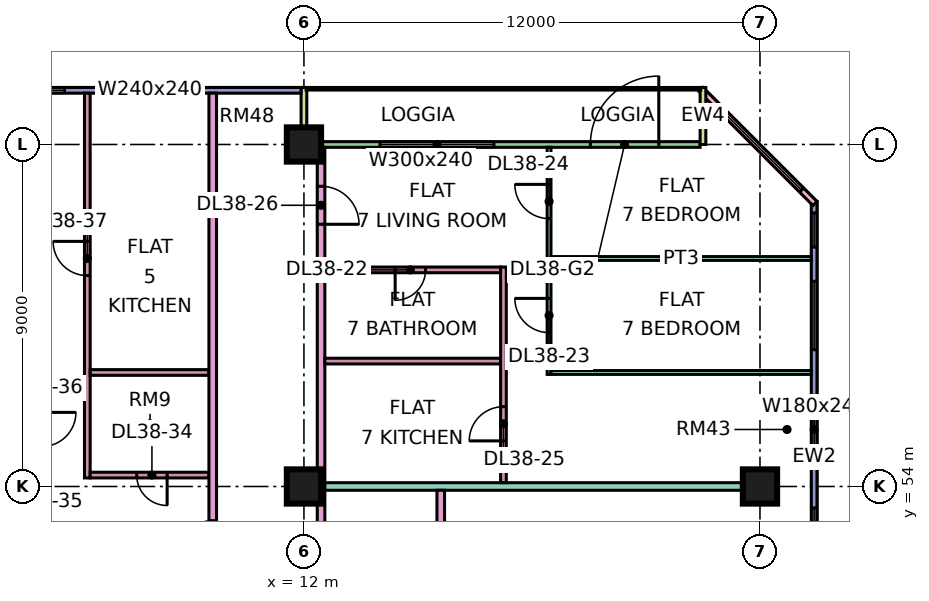
"""IFC4 building model, lengths in metres.
Left out: names, types, materials, properties, quantities, classifications, styles, units other than length and angle.
Written with IfcOpenShell. Run it as: python <this file> out.ifc"""

import sys

from ifc_helpers import new_model, si_unit, direction, frame, frame_2d, origin, origin_2d, place, context, subcontext, project, spatial, rectangle, extrude, element, fill, save


model = new_model("IFC4")
c1 = context("Model", 3, precision=1e-05, world=origin(), true_north=direction((0.0, 1.0)))
c2 = subcontext(c1, "Body", "Model", "MODEL_VIEW")
j1 = project(units=[si_unit("LENGTHUNIT", "METRE"), si_unit("PLANEANGLEUNIT", "RADIAN")], contexts=[c1])
p1 = place(None, origin())
s1 = spatial("IfcSite", under=j1, at=p1, CompositionType="ELEMENT")
p2 = place(p1, origin())
s2 = spatial("IfcBuilding", under=s1, at=p2, CompositionType="ELEMENT")
p3 = place(p2, frame((0.0, 0.0, 168.65)))
s3 = spatial("IfcBuildingStorey", under=s2, at=p3, CompositionType="ELEMENT", Elevation=168.65)
for number, where, z_axis, x_axis in (
    (1, (12.0, 54.0, 0.0), (0.0, 0.0, 1.0), (1.0, 0.0, 0.0)),
    (2, (12.0, 63.0, 0.0), (0.0, 0.0, 1.0), (1.0, 0.0, 0.0)),
    (3, (24.0, 54.0, 0.0), (0.0, 0.0, 1.0), (1.0, 0.0, 0.0)),
):
    element("IfcColumn", number, at=place(p3, frame(where, z_axis=z_axis, x_axis=x_axis)), inside=s3, PredefinedType="COLUMN", context=c2, shape_type="SweptSolid", body=[
        extrude(rectangle(XDim=0.9, YDim=0.9, at=origin_2d()), origin(), (0.0, 0.0, 1.0), 3.75),
    ])
p4 = place(p3, frame((25.425, 48.075, 0.0), z_axis=(0.0, 0.0, 1.0), x_axis=(0.0, 1.0, 0.0)))
e4 = element("IfcWall", 4, at=p4, inside=s3, PredefinedType="SOLIDWALL", context=c2, shape_type="SweptSolid", body=[
    extrude(rectangle(XDim=13.425, YDim=0.15, at=frame_2d((6.712, 0.0))), origin(), (0.0, 0.0, 1.0), 3.35),
])
p5 = place(p4, frame((0.562, 0.0, 0.45)))
e5 = element("IfcOpeningElement", 5, at=p5, cuts=e4, PredefinedType="OPENING", context=c2, shape_type="SweptSolid", body=[
    extrude(rectangle(XDim=4.8, YDim=2.4, at=frame_2d((2.4, 1.2))), frame((0.0, 0.085, 0.0), z_axis=(0.0, -1.0, 0.0), x_axis=(1.0, 0.0, 0.0)), (0.0, 0.0, 1.0), 0.17),
])
p6 = place(p4, frame((6.525, 0.0, 0.45)))
e6 = element("IfcOpeningElement", 6, at=p6, cuts=e4, PredefinedType="OPENING", context=c2, shape_type="SweptSolid", body=[
    extrude(rectangle(XDim=1.8, YDim=2.4, at=frame_2d((0.9, 1.2))), frame((0.0, 0.085, 0.0), z_axis=(0.0, -1.0, 0.0), x_axis=(1.0, 0.0, 0.0)), (0.0, 0.0, 1.0), 0.17),
])
p7 = place(p4, frame((9.525, 0.0, 0.45)))
e7 = element("IfcOpeningElement", 7, at=p7, cuts=e4, PredefinedType="OPENING", context=c2, shape_type="SweptSolid", body=[
    extrude(rectangle(XDim=1.8, YDim=2.4, at=frame_2d((0.9, 1.2))), frame((0.0, 0.085, 0.0), z_axis=(0.0, -1.0, 0.0), x_axis=(1.0, 0.0, 0.0)), (0.0, 0.0, 1.0), 0.17),
])
p8 = place(p4, frame((12.225, 0.0, 0.45)))
e8 = element("IfcOpeningElement", 8, at=p8, cuts=e4, PredefinedType="OPENING", context=c2, shape_type="SweptSolid", body=[
    extrude(rectangle(XDim=0.9, YDim=2.4, at=frame_2d((0.45, 1.2))), frame((0.0, 0.085, 0.0), z_axis=(0.0, -1.0, 0.0), x_axis=(1.0, 0.0, 0.0)), (0.0, 0.0, 1.0), 0.17),
])
p9 = place(p3, frame((25.447, 61.447, 0.0), z_axis=(0.0, 0.0, 1.0), x_axis=(-0.707106781187, 0.707106781187, 0.0)))
e9 = element("IfcWall", 9, at=p9, inside=s3, PredefinedType="SOLIDWALL", context=c2, shape_type="SweptSolid", body=[
    extrude(rectangle(XDim=4.243, YDim=0.15, at=frame_2d((2.121, 0.0))), origin(), (0.0, 0.0, 1.0), 3.35),
])
p10 = place(p9, frame((0.498, 0.0, 0.45)))
e10 = element("IfcOpeningElement", 10, at=p10, cuts=e9, PredefinedType="OPENING", context=c2, shape_type="SweptSolid", body=[
    extrude(rectangle(XDim=3.0, YDim=2.4, at=frame_2d((1.5, 1.2))), frame((0.0, 0.085, 0.0), z_axis=(0.0, -1.0, 0.0), x_axis=(1.0, 0.0, 0.0)), (0.0, 0.0, 1.0), 0.17),
])
p11 = place(p3, frame((22.425, 63.0, 0.0), z_axis=(0.0, 0.0, 1.0), x_axis=(-1.0, 0.0, 0.0)))
e11 = element("IfcWall", 11, at=p11, inside=s3, PredefinedType="SOLIDWALL", context=c2, shape_type="SweptSolid", body=[
    extrude(rectangle(XDim=10.35, YDim=0.15, at=frame_2d((5.175, 0.0))), origin(), (0.0, 0.0, 1.0), 3.35),
])
p12 = place(p11, frame((1.087, 0.0, 0.0)))
e12 = element("IfcOpeningElement", 12, at=p12, cuts=e11, PredefinedType="OPENING", context=c2, shape_type="SweptSolid", body=[
    extrude(rectangle(XDim=1.8, YDim=2.4, at=frame_2d((0.9, 1.2))), frame((0.0, 0.085, 0.0), z_axis=(0.0, -1.0, 0.0), x_axis=(1.0, 0.0, 0.0)), (0.0, 0.0, 1.0), 0.17),
])
p13 = place(p11, frame((5.425, 0.0, 0.45)))
e13 = element("IfcOpeningElement", 13, at=p13, cuts=e11, PredefinedType="OPENING", context=c2, shape_type="SweptSolid", body=[
    extrude(rectangle(XDim=3.0, YDim=2.4, at=frame_2d((1.5, 1.2))), frame((0.0, 0.085, 0.0), z_axis=(0.0, -1.0, 0.0), x_axis=(1.0, 0.0, 0.0)), (0.0, 0.0, 1.0), 0.17),
])
for number, where, z_axis, x_axis in (
    (14, (22.5, 64.5, 0.0), (0.0, 0.0, 1.0), (0.0, -1.0, 0.0)),
    (15, (12.0, 64.5, 0.0), (0.0, 0.0, 1.0), (0.0, -1.0, 0.0)),
):
    element("IfcWall", number, at=place(p3, frame(where, z_axis=z_axis, x_axis=x_axis)), inside=s3, PredefinedType="SOLIDWALL", context=c2, shape_type="SweptSolid", body=[
        extrude(rectangle(XDim=1.5, YDim=0.15, at=frame_2d((0.75, 0.0))), origin(), (0.0, 0.0, 1.0), 3.35),
    ])
p14 = place(p3, frame((11.925, 64.425, 0.0), z_axis=(0.0, 0.0, 1.0), x_axis=(-1.0, 0.0, 0.0)))
e16 = element("IfcWall", 16, at=p14, inside=s3, PredefinedType="SOLIDWALL", context=c2, shape_type="SweptSolid", body=[
    extrude(rectangle(XDim=10.425, YDim=0.15, at=frame_2d((5.212, 0.0))), origin(), (0.0, 0.0, 1.0), 3.35),
])
p15 = place(p14, frame((2.775, 0.0, 0.45)))
e17 = element("IfcOpeningElement", 17, at=p15, cuts=e16, PredefinedType="OPENING", context=c2, shape_type="SweptSolid", body=[
    extrude(rectangle(XDim=2.4, YDim=2.4, at=frame_2d((1.2, 1.2))), frame((0.0, 0.085, 0.0), z_axis=(0.0, -1.0, 0.0), x_axis=(1.0, 0.0, 0.0)), (0.0, 0.0, 1.0), 0.17),
])
p16 = place(p14, frame((6.225, 0.0, 0.45)))
e18 = element("IfcOpeningElement", 18, at=p16, cuts=e16, PredefinedType="OPENING", context=c2, shape_type="SweptSolid", body=[
    extrude(rectangle(XDim=3.6, YDim=2.4, at=frame_2d((1.8, 1.2))), frame((0.0, 0.085, 0.0), z_axis=(0.0, -1.0, 0.0), x_axis=(1.0, 0.0, 0.0)), (0.0, 0.0, 1.0), 0.17),
])
p17 = place(p3, frame((6.3, 54.225, 0.0), z_axis=(0.0, 0.0, 1.0), x_axis=(0.0, 1.0, 0.0)))
e19 = element("IfcWall", 19, at=p17, inside=s3, PredefinedType="PARTITIONING", context=c2, shape_type="SweptSolid", body=[
    extrude(rectangle(XDim=10.125, YDim=0.15, at=frame_2d((5.062, 0.0))), origin(), (0.0, 0.0, 1.0), 3.35),
])
p18 = place(p17, frame((5.325, 0.0, 0.0)))
e20 = element("IfcOpeningElement", 20, at=p18, cuts=e19, PredefinedType="OPENING", context=c2, shape_type="SweptSolid", body=[
    extrude(rectangle(XDim=0.9, YDim=2.1, at=frame_2d((0.45, 1.05))), frame((0.0, 0.085, 0.0), z_axis=(0.0, -1.0, 0.0), x_axis=(1.0, 0.0, 0.0)), (0.0, 0.0, 1.0), 0.17),
])
p19 = place(p3, frame((6.375, 54.3, 0.0), z_axis=(0.0, 0.0, 1.0), x_axis=(1.0, 0.0, 0.0)))
e21 = element("IfcWall", 21, at=p19, inside=s3, PredefinedType="PARTITIONING", context=c2, shape_type="SweptSolid", body=[
    extrude(rectangle(XDim=3.125, YDim=0.15, at=frame_2d((1.562, 0.0))), origin(), (0.0, 0.0, 1.0), 3.35),
])
p20 = place(p19, frame((1.225, 0.0, 0.0)))
e22 = element("IfcOpeningElement", 22, at=p20, cuts=e21, PredefinedType="OPENING", context=c2, shape_type="SweptSolid", body=[
    extrude(rectangle(XDim=0.8, YDim=2.1, at=frame_2d((0.4, 1.05))), frame((0.0, 0.085, 0.0), z_axis=(0.0, -1.0, 0.0), x_axis=(1.0, 0.0, 0.0)), (0.0, 0.0, 1.0), 0.17),
])
p21 = place(p3, frame((6.375, 57.0, 0.0), z_axis=(0.0, 0.0, 1.0), x_axis=(1.0, 0.0, 0.0)))
e23 = element("IfcWall", 23, at=p21, inside=s3, PredefinedType="PARTITIONING", context=c2, shape_type="SweptSolid", body=[
    extrude(rectangle(XDim=3.125, YDim=0.15, at=frame_2d((1.562, 0.0))), origin(), (0.0, 0.0, 1.0), 3.35),
])
p22 = place(p3, frame((9.6, 20.0, 0.0), z_axis=(0.0, 0.0, 1.0), x_axis=(0.0, 1.0, 0.0)))
e24 = element("IfcWall", 24, at=p22, inside=s3, PredefinedType="PARTITIONING", context=c2, shape_type="SweptSolid", body=[
    extrude(rectangle(XDim=44.35, YDim=0.2, at=frame_2d((22.175, 0.0))), origin(), (0.0, 0.0, 1.0), 3.35),
])
p23 = place(p22, frame((28.8, 0.0, 0.0)))
e25 = element("IfcOpeningElement", 25, at=p23, cuts=e24, PredefinedType="OPENING", context=c2, shape_type="SweptSolid", body=[
    extrude(rectangle(XDim=1.0, YDim=2.1, at=frame_2d((0.5, 1.05))), frame((0.0, 0.11, 0.0), z_axis=(0.0, -1.0, 0.0), x_axis=(1.0, 0.0, 0.0)), (0.0, 0.0, 1.0), 0.22),
])
p24 = place(p22, frame((32.1, 0.0, 0.0)))
e26 = element("IfcOpeningElement", 26, at=p24, cuts=e24, PredefinedType="OPENING", context=c2, shape_type="SweptSolid", body=[
    extrude(rectangle(XDim=1.0, YDim=2.1, at=frame_2d((0.5, 1.05))), frame((0.0, 0.11, 0.0), z_axis=(0.0, -1.0, 0.0), x_axis=(1.0, 0.0, 0.0)), (0.0, 0.0, 1.0), 0.22),
])
p25 = place(p22, frame((0.6, 0.0, 0.0)))
e27 = element("IfcOpeningElement", 27, at=p25, cuts=e24, PredefinedType="OPENING", context=c2, shape_type="SweptSolid", body=[
    extrude(rectangle(XDim=1.2, YDim=2.1, at=frame_2d((0.6, 1.05))), frame((0.0, 0.11, 0.0), z_axis=(0.0, -1.0, 0.0), x_axis=(1.0, 0.0, 0.0)), (0.0, 0.0, 1.0), 0.22),
])
p26 = place(p22, frame((14.25, 0.0, 0.0)))
e28 = element("IfcOpeningElement", 28, at=p26, cuts=e24, PredefinedType="OPENING", context=c2, shape_type="SweptSolid", body=[
    extrude(rectangle(XDim=1.0, YDim=2.1, at=frame_2d((0.5, 1.05))), frame((0.0, 0.11, 0.0), z_axis=(0.0, -1.0, 0.0), x_axis=(1.0, 0.0, 0.0)), (0.0, 0.0, 1.0), 0.22),
])
p27 = place(p3, frame((12.45, 20.0, 0.0), z_axis=(0.0, 0.0, 1.0), x_axis=(0.0, 1.0, 0.0)))
e29 = element("IfcWall", 29, at=p27, inside=s3, PredefinedType="PARTITIONING", context=c2, shape_type="SweptSolid", body=[
    extrude(rectangle(XDim=42.926, YDim=0.2, at=frame_2d((21.463, 0.0))), origin(), (0.0, 0.0, 1.0), 3.35),
])
p28 = place(p27, frame((6.55, 0.0, 0.0)))
e30 = element("IfcOpeningElement", 30, at=p28, cuts=e29, PredefinedType="OPENING", context=c2, shape_type="SweptSolid", body=[
    extrude(rectangle(XDim=1.0, YDim=2.1, at=frame_2d((0.5, 1.05))), frame((0.0, 0.11, 0.0), z_axis=(0.0, -1.0, 0.0), x_axis=(1.0, 0.0, 0.0)), (0.0, 0.0, 1.0), 0.22),
])
p29 = place(p27, frame((12.25, 0.0, 0.0)))
e31 = element("IfcOpeningElement", 31, at=p29, cuts=e29, PredefinedType="OPENING", context=c2, shape_type="SweptSolid", body=[
    extrude(rectangle(XDim=1.6, YDim=2.1, at=frame_2d((0.8, 1.05))), frame((0.0, 0.11, 0.0), z_axis=(0.0, -1.0, 0.0), x_axis=(1.0, 0.0, 0.0)), (0.0, 0.0, 1.0), 0.22),
])
p30 = place(p27, frame((16.9, 0.0, 0.0)))
e32 = element("IfcOpeningElement", 32, at=p30, cuts=e29, PredefinedType="OPENING", context=c2, shape_type="SweptSolid", body=[
    extrude(rectangle(XDim=1.0, YDim=2.1, at=frame_2d((0.5, 1.05))), frame((0.0, 0.11, 0.0), z_axis=(0.0, -1.0, 0.0), x_axis=(1.0, 0.0, 0.0)), (0.0, 0.0, 1.0), 0.22),
])
p31 = place(p27, frame((40.9, 0.0, 0.0)))
e33 = element("IfcOpeningElement", 33, at=p31, cuts=e29, PredefinedType="OPENING", context=c2, shape_type="SweptSolid", body=[
    extrude(rectangle(XDim=1.0, YDim=2.1, at=frame_2d((0.5, 1.05))), frame((0.0, 0.11, 0.0), z_axis=(0.0, -1.0, 0.0), x_axis=(1.0, 0.0, 0.0)), (0.0, 0.0, 1.0), 0.22),
])
p32 = place(p27, frame((1.15, 0.0, 0.0)))
e34 = element("IfcOpeningElement", 34, at=p32, cuts=e29, PredefinedType="OPENING", context=c2, shape_type="SweptSolid", body=[
    extrude(rectangle(XDim=1.8, YDim=2.1, at=frame_2d((0.9, 1.05))), frame((0.0, 0.11, 0.0), z_axis=(0.0, -1.0, 0.0), x_axis=(1.0, 0.0, 0.0)), (0.0, 0.0, 1.0), 0.22),
])
p33 = place(p27, frame((28.6, 0.0, 0.0)))
e35 = element("IfcOpeningElement", 35, at=p33, cuts=e29, PredefinedType="OPENING", context=c2, shape_type="SweptSolid", body=[
    extrude(rectangle(XDim=1.8, YDim=2.1, at=frame_2d((0.9, 1.05))), frame((0.0, 0.11, 0.0), z_axis=(0.0, -1.0, 0.0), x_axis=(1.0, 0.0, 0.0)), (0.0, 0.0, 1.0), 0.22),
])
p34 = place(p3, frame((12.55, 54.0, 0.0), z_axis=(0.0, 0.0, 1.0), x_axis=(1.0, 0.0, 0.0)))
e36 = element("IfcWall", 36, at=p34, inside=s3, PredefinedType="PARTITIONING", context=c2, shape_type="SweptSolid", body=[
    extrude(rectangle(XDim=11.45, YDim=0.2, at=frame_2d((5.725, 0.0))), origin(), (0.0, 0.0, 1.0), 3.35),
])
p35 = place(p3, frame((12.55, 57.3, 0.0), z_axis=(0.0, 0.0, 1.0), x_axis=(1.0, 0.0, 0.0)))
e37 = element("IfcWall", 37, at=p35, inside=s3, PredefinedType="PARTITIONING", context=c2, shape_type="SweptSolid", body=[
    extrude(rectangle(XDim=4.625, YDim=0.15, at=frame_2d((2.312, 0.0))), origin(), (0.0, 0.0, 1.0), 3.35),
])
p36 = place(p3, frame((12.55, 59.7, 0.0), z_axis=(0.0, 0.0, 1.0), x_axis=(1.0, 0.0, 0.0)))
e38 = element("IfcWall", 38, at=p36, inside=s3, PredefinedType="PARTITIONING", context=c2, shape_type="SweptSolid", body=[
    extrude(rectangle(XDim=4.625, YDim=0.15, at=frame_2d((2.312, 0.0))), origin(), (0.0, 0.0, 1.0), 3.35),
])
p37 = place(p36, frame((1.85, 0.0, 0.0)))
e39 = element("IfcOpeningElement", 39, at=p37, cuts=e38, PredefinedType="OPENING", context=c2, shape_type="SweptSolid", body=[
    extrude(rectangle(XDim=0.8, YDim=2.1, at=frame_2d((0.4, 1.05))), frame((0.0, 0.085, 0.0), z_axis=(0.0, -1.0, 0.0), x_axis=(1.0, 0.0, 0.0)), (0.0, 0.0, 1.0), 0.17),
])
p38 = place(p3, frame((15.6, 51.225, 0.0), z_axis=(0.0, 0.0, 1.0), x_axis=(0.0, 1.0, 0.0)))
e40 = element("IfcWall", 40, at=p38, inside=s3, PredefinedType="PARTITIONING", context=c2, shape_type="SweptSolid", body=[
    extrude(rectangle(XDim=2.675, YDim=0.2, at=frame_2d((1.337, 0.0))), origin(), (0.0, 0.0, 1.0), 3.35),
])
p39 = place(p3, frame((17.25, 54.1, 0.0), z_axis=(0.0, 0.0, 1.0), x_axis=(0.0, 1.0, 0.0)))
e41 = element("IfcWall", 41, at=p39, inside=s3, PredefinedType="PARTITIONING", context=c2, shape_type="SweptSolid", body=[
    extrude(rectangle(XDim=5.675, YDim=0.15, at=frame_2d((2.837, 0.0))), origin(), (0.0, 0.0, 1.0), 3.35),
])
p40 = place(p39, frame((1.1, 0.0, 0.0)))
e42 = element("IfcOpeningElement", 42, at=p40, cuts=e41, PredefinedType="OPENING", context=c2, shape_type="SweptSolid", body=[
    extrude(rectangle(XDim=0.9, YDim=2.1, at=frame_2d((0.45, 1.05))), frame((0.0, 0.085, 0.0), z_axis=(0.0, -1.0, 0.0), x_axis=(1.0, 0.0, 0.0)), (0.0, 0.0, 1.0), 0.17),
])
p41 = place(p3, frame((18.45, 56.95, 0.0), z_axis=(0.0, 0.0, 1.0), x_axis=(0.0, 1.0, 0.0)))
e43 = element("IfcWall", 43, at=p41, inside=s3, PredefinedType="PARTITIONING", context=c2, shape_type="SweptSolid", body=[
    extrude(rectangle(XDim=5.976, YDim=0.1, at=frame_2d((2.988, 0.0))), origin(), (0.0, 0.0, 1.0), 3.35),
])
p42 = place(p41, frame((1.1, 0.0, 0.0)))
e44 = element("IfcOpeningElement", 44, at=p42, cuts=e43, PredefinedType="OPENING", context=c2, shape_type="SweptSolid", body=[
    extrude(rectangle(XDim=0.9, YDim=2.1, at=frame_2d((0.45, 1.05))), frame((0.0, 0.06, 0.0), z_axis=(0.0, -1.0, 0.0), x_axis=(1.0, 0.0, 0.0)), (0.0, 0.0, 1.0), 0.12),
])
p43 = place(p41, frame((4.1, 0.0, 0.0)))
e45 = element("IfcOpeningElement", 45, at=p43, cuts=e43, PredefinedType="OPENING", context=c2, shape_type="SweptSolid", body=[
    extrude(rectangle(XDim=0.9, YDim=2.1, at=frame_2d((0.45, 1.05))), frame((0.0, 0.06, 0.0), z_axis=(0.0, -1.0, 0.0), x_axis=(1.0, 0.0, 0.0)), (0.0, 0.0, 1.0), 0.12),
])
p44 = place(p3, frame((18.5, 57.0, 0.0), z_axis=(0.0, 0.0, 1.0), x_axis=(1.0, 0.0, 0.0)))
e46 = element("IfcWall", 46, at=p44, inside=s3, PredefinedType="PARTITIONING", context=c2, shape_type="SweptSolid", body=[
    extrude(rectangle(XDim=6.85, YDim=0.1, at=frame_2d((3.425, 0.0))), origin(), (0.0, 0.0, 1.0), 3.35),
])
p45 = place(p3, frame((18.5, 60.0, 0.0), z_axis=(0.0, 0.0, 1.0), x_axis=(1.0, 0.0, 0.0)))
e47 = element("IfcWall", 47, at=p45, inside=s3, PredefinedType="PARTITIONING", context=c2, shape_type="SweptSolid", body=[
    extrude(rectangle(XDim=6.851, YDim=0.1, at=frame_2d((3.426, 0.0))), origin(), (0.0, 0.0, 1.0), 3.35),
])
p46 = place(p5, origin())
e48 = element("IfcWindow", 48, at=p46, inside=s3, PartitioningType="SINGLE_PANEL", PredefinedType="WINDOW", context=c2, shape_type="SweptSolid", body=[
    extrude(rectangle(XDim=4.8, YDim=2.4, at=frame_2d((2.4, 1.2))), frame((0.0, 0.03, 0.0), z_axis=(0.0, -1.0, 0.0), x_axis=(1.0, 0.0, 0.0)), (0.0, 0.0, 1.0), 0.06),
])
fill(e5, e48)
p47 = place(p6, origin())
e49 = element("IfcWindow", 49, at=p47, inside=s3, PartitioningType="SINGLE_PANEL", PredefinedType="WINDOW", context=c2, shape_type="SweptSolid", body=[
    extrude(rectangle(XDim=1.8, YDim=2.4, at=frame_2d((0.9, 1.2))), frame((0.0, 0.03, 0.0), z_axis=(0.0, -1.0, 0.0), x_axis=(1.0, 0.0, 0.0)), (0.0, 0.0, 1.0), 0.06),
])
fill(e6, e49)
p48 = place(p7, origin())
e50 = element("IfcWindow", 50, at=p48, inside=s3, PartitioningType="SINGLE_PANEL", PredefinedType="WINDOW", context=c2, shape_type="SweptSolid", body=[
    extrude(rectangle(XDim=1.8, YDim=2.4, at=frame_2d((0.9, 1.2))), frame((0.0, 0.03, 0.0), z_axis=(0.0, -1.0, 0.0), x_axis=(1.0, 0.0, 0.0)), (0.0, 0.0, 1.0), 0.06),
])
fill(e7, e50)
p49 = place(p8, origin())
e51 = element("IfcWindow", 51, at=p49, inside=s3, PartitioningType="SINGLE_PANEL", PredefinedType="WINDOW", context=c2, shape_type="SweptSolid", body=[
    extrude(rectangle(XDim=0.9, YDim=2.4, at=frame_2d((0.45, 1.2))), frame((0.0, 0.03, 0.0), z_axis=(0.0, -1.0, 0.0), x_axis=(1.0, 0.0, 0.0)), (0.0, 0.0, 1.0), 0.06),
])
fill(e8, e51)
p50 = place(p10, origin())
e52 = element("IfcWindow", 52, at=p50, inside=s3, PartitioningType="SINGLE_PANEL", PredefinedType="WINDOW", context=c2, shape_type="SweptSolid", body=[
    extrude(rectangle(XDim=3.0, YDim=2.4, at=frame_2d((1.5, 1.2))), frame((0.0, 0.03, 0.0), z_axis=(0.0, -1.0, 0.0), x_axis=(1.0, 0.0, 0.0)), (0.0, 0.0, 1.0), 0.06),
])
fill(e10, e52)
p51 = place(p12, frame((1.8, 0.0, 0.0), z_axis=(0.0, 0.0, 1.0), x_axis=(-1.0, 0.0, 0.0)))
e53 = element("IfcDoor", 53, at=p51, inside=s3, OperationType="DOUBLE_DOOR_SINGLE_SWING", PredefinedType="DOOR", context=c2, shape_type="SweptSolid", body=[
    extrude(rectangle(XDim=1.8, YDim=2.4, at=frame_2d((0.9, 1.2))), frame((0.0, 0.025, 0.0), z_axis=(0.0, -1.0, 0.0), x_axis=(1.0, 0.0, 0.0)), (0.0, 0.0, 1.0), 0.05),
])
fill(e12, e53)
p52 = place(p13, origin())
e54 = element("IfcWindow", 54, at=p52, inside=s3, PartitioningType="SINGLE_PANEL", PredefinedType="WINDOW", context=c2, shape_type="SweptSolid", body=[
    extrude(rectangle(XDim=3.0, YDim=2.4, at=frame_2d((1.5, 1.2))), frame((0.0, 0.03, 0.0), z_axis=(0.0, -1.0, 0.0), x_axis=(1.0, 0.0, 0.0)), (0.0, 0.0, 1.0), 0.06),
])
fill(e13, e54)
p53 = place(p15, origin())
e55 = element("IfcWindow", 55, at=p53, inside=s3, PartitioningType="SINGLE_PANEL", PredefinedType="WINDOW", context=c2, shape_type="SweptSolid", body=[
    extrude(rectangle(XDim=2.4, YDim=2.4, at=frame_2d((1.2, 1.2))), frame((0.0, 0.03, 0.0), z_axis=(0.0, -1.0, 0.0), x_axis=(1.0, 0.0, 0.0)), (0.0, 0.0, 1.0), 0.06),
])
fill(e17, e55)
p54 = place(p16, origin())
e56 = element("IfcWindow", 56, at=p54, inside=s3, PartitioningType="SINGLE_PANEL", PredefinedType="WINDOW", context=c2, shape_type="SweptSolid", body=[
    extrude(rectangle(XDim=3.6, YDim=2.4, at=frame_2d((1.8, 1.2))), frame((0.0, 0.03, 0.0), z_axis=(0.0, -1.0, 0.0), x_axis=(1.0, 0.0, 0.0)), (0.0, 0.0, 1.0), 0.06),
])
fill(e18, e56)
p55 = place(p37, frame((0.8, 0.0, 0.0), z_axis=(0.0, 0.0, 1.0), x_axis=(-1.0, 0.0, 0.0)))
e57 = element("IfcDoor", 57, at=p55, inside=s3, OperationType="SINGLE_SWING_LEFT", PredefinedType="DOOR", context=c2, shape_type="SweptSolid", body=[
    extrude(rectangle(XDim=0.8, YDim=2.1, at=frame_2d((0.4, 1.05))), frame((0.0, 0.025, 0.0), z_axis=(0.0, -1.0, 0.0), x_axis=(1.0, 0.0, 0.0)), (0.0, 0.0, 1.0), 0.05),
])
fill(e39, e57)
p56 = place(p42, frame((0.9, 0.0, 0.0), z_axis=(0.0, 0.0, 1.0), x_axis=(-1.0, 0.0, 0.0)))
e58 = element("IfcDoor", 58, at=p56, inside=s3, OperationType="SINGLE_SWING_RIGHT", PredefinedType="DOOR", context=c2, shape_type="SweptSolid", body=[
    extrude(rectangle(XDim=0.9, YDim=2.1, at=frame_2d((0.45, 1.05))), frame((0.0, 0.025, 0.0), z_axis=(0.0, -1.0, 0.0), x_axis=(1.0, 0.0, 0.0)), (0.0, 0.0, 1.0), 0.05),
])
fill(e44, e58)
p57 = place(p43, frame((0.9, 0.0, 0.0), z_axis=(0.0, 0.0, 1.0), x_axis=(-1.0, 0.0, 0.0)))
e59 = element("IfcDoor", 59, at=p57, inside=s3, OperationType="SINGLE_SWING_RIGHT", PredefinedType="DOOR", context=c2, shape_type="SweptSolid", body=[
    extrude(rectangle(XDim=0.9, YDim=2.1, at=frame_2d((0.45, 1.05))), frame((0.0, 0.025, 0.0), z_axis=(0.0, -1.0, 0.0), x_axis=(1.0, 0.0, 0.0)), (0.0, 0.0, 1.0), 0.05),
])
fill(e45, e59)
p58 = place(p40, origin())
e60 = element("IfcDoor", 60, at=p58, inside=s3, OperationType="SINGLE_SWING_LEFT", PredefinedType="DOOR", context=c2, shape_type="SweptSolid", body=[
    extrude(rectangle(XDim=0.9, YDim=2.1, at=frame_2d((0.45, 1.05))), frame((0.0, 0.025, 0.0), z_axis=(0.0, -1.0, 0.0), x_axis=(1.0, 0.0, 0.0)), (0.0, 0.0, 1.0), 0.05),
])
fill(e42, e60)
p59 = place(p31, frame((1.0, 0.0, 0.0), z_axis=(0.0, 0.0, 1.0), x_axis=(-1.0, 0.0, 0.0)))
e61 = element("IfcDoor", 61, at=p59, inside=s3, OperationType="SINGLE_SWING_LEFT", PredefinedType="DOOR", context=c2, shape_type="SweptSolid", body=[
    extrude(rectangle(XDim=1.0, YDim=2.1, at=frame_2d((0.5, 1.05))), frame((0.0, 0.025, 0.0), z_axis=(0.0, -1.0, 0.0), x_axis=(1.0, 0.0, 0.0)), (0.0, 0.0, 1.0), 0.05),
])
fill(e33, e61)
p60 = place(p20, origin())
e62 = element("IfcDoor", 62, at=p60, inside=s3, OperationType="SINGLE_SWING_RIGHT", PredefinedType="DOOR", context=c2, shape_type="SweptSolid", body=[
    extrude(rectangle(XDim=0.8, YDim=2.1, at=frame_2d((0.4, 1.05))), frame((0.0, 0.025, 0.0), z_axis=(0.0, -1.0, 0.0), x_axis=(1.0, 0.0, 0.0)), (0.0, 0.0, 1.0), 0.05),
])
fill(e22, e62)
p61 = place(p18, frame((0.9, 0.0, 0.0), z_axis=(0.0, 0.0, 1.0), x_axis=(-1.0, 0.0, 0.0)))
e63 = element("IfcDoor", 63, at=p61, inside=s3, OperationType="SINGLE_SWING_RIGHT", PredefinedType="DOOR", context=c2, shape_type="SweptSolid", body=[
    extrude(rectangle(XDim=0.9, YDim=2.1, at=frame_2d((0.45, 1.05))), frame((0.0, 0.025, 0.0), z_axis=(0.0, -1.0, 0.0), x_axis=(1.0, 0.0, 0.0)), (0.0, 0.0, 1.0), 0.05),
])
fill(e20, e63)
p62 = place(p24, origin())
e64 = element("IfcDoor", 64, at=p62, inside=s3, OperationType="SINGLE_SWING_LEFT", PredefinedType="DOOR", context=c2, shape_type="SweptSolid", body=[
    extrude(rectangle(XDim=1.0, YDim=2.1, at=frame_2d((0.5, 1.05))), frame((0.0, 0.025, 0.0), z_axis=(0.0, -1.0, 0.0), x_axis=(1.0, 0.0, 0.0)), (0.0, 0.0, 1.0), 0.05),
])
fill(e26, e64)
save(model, sys.argv[1])
